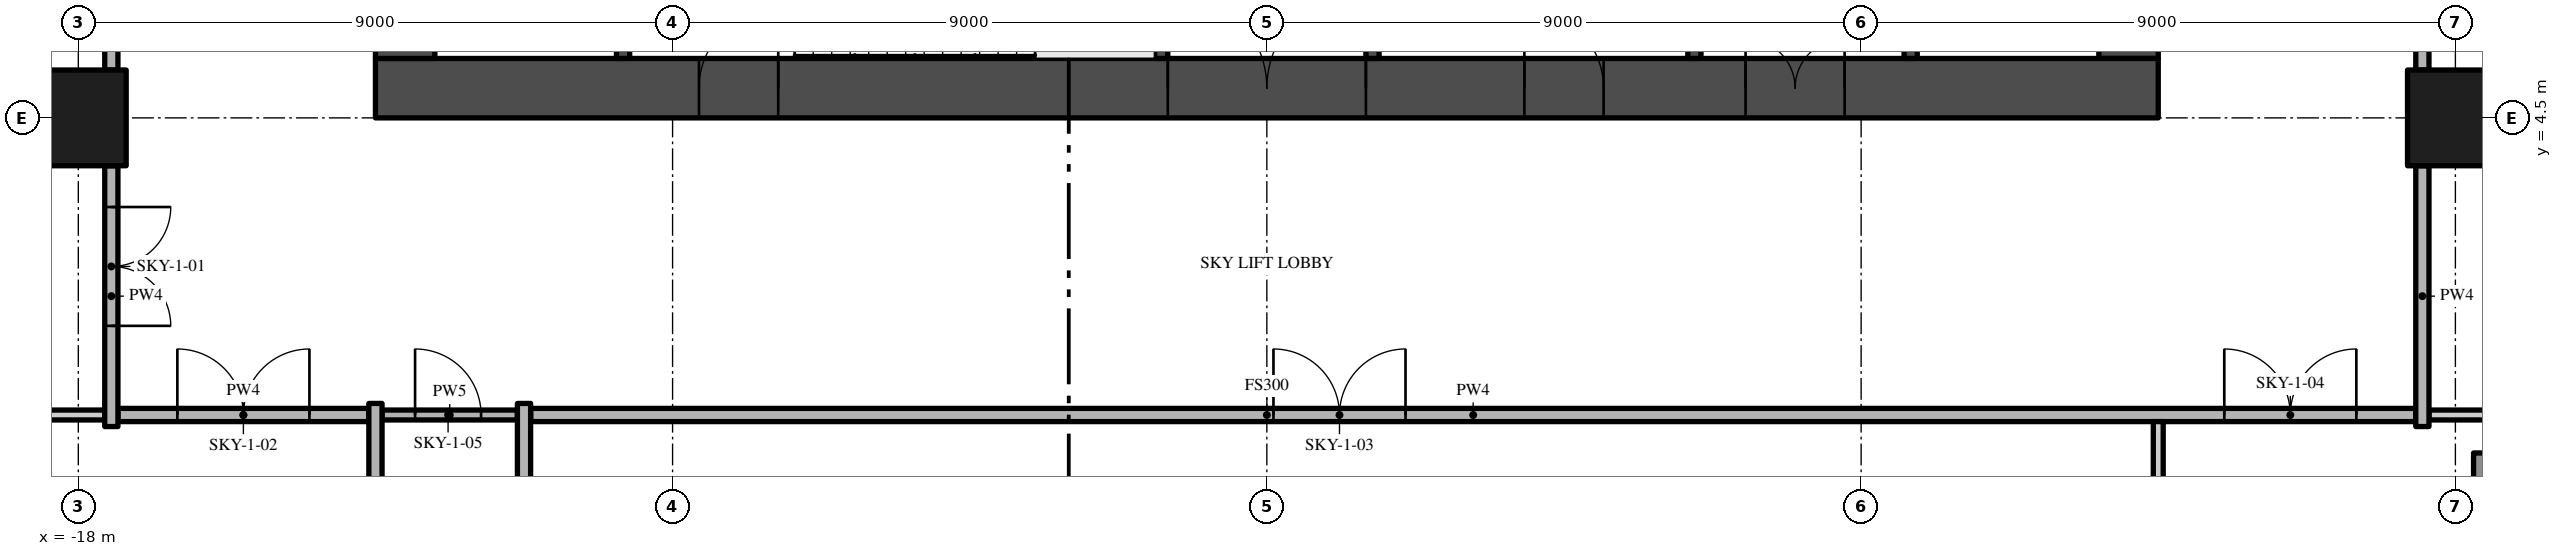
"""IFC4 building model, lengths in metres.
Left out: names, types, materials, properties, quantities, classifications, styles, units other than length and angle.
Written with IfcOpenShell. Run it as: python <this file> out.ifc"""

import sys

from ifc_helpers import new_model, si_unit, direction, frame, frame_2d, origin, origin_2d, place, context, subcontext, project, spatial, polyline, rectangle, outline, extrude, element, fill, save


model = new_model("IFC4")
c1 = context("Model", 3, precision=1e-05, world=origin(), true_north=direction((0.0, 1.0)))
c2 = subcontext(c1, "Body", "Model", "MODEL_VIEW")
j1 = project(units=[si_unit("LENGTHUNIT", "METRE"), si_unit("PLANEANGLEUNIT", "RADIAN")], contexts=[c1])
p1 = place(None, origin())
s1 = spatial("IfcSite", under=j1, at=p1, CompositionType="ELEMENT")
p2 = place(p1, origin())
s2 = spatial("IfcBuilding", under=s1, at=p2, CompositionType="ELEMENT")
p3 = place(p2, frame((0.0, 0.0, 64.4)))
s3 = spatial("IfcBuildingStorey", under=s2, at=p3, CompositionType="ELEMENT", Elevation=64.4)
p4 = place(p3, frame((-13.5, 4.95, -0.3), z_axis=(0.0, 0.0, 1.0), x_axis=(1.0, 0.0, 0.0)))
e1 = element("IfcWall", 1, at=p4, inside=s3, PredefinedType="SHEAR", context=c2, shape_type="SweptSolid", body=[
    extrude(rectangle(XDim=27.0, YDim=0.9, at=frame_2d((13.5, 0.0))), origin(), (0.0, 0.0, 1.0), 5.0),
])
p5 = place(p4, frame((12.0, 0.0, 0.3)))
e2 = element("IfcOpeningElement", 2, at=p5, cuts=e1, PredefinedType="OPENING", context=c2, shape_type="SweptSolid", body=[
    extrude(rectangle(XDim=3.0, YDim=2.4, at=frame_2d((1.5, 1.2))), frame((0.0, 0.46, 0.0), z_axis=(0.0, -1.0, 0.0), x_axis=(1.0, 0.0, 0.0)), (0.0, 0.0, 1.0), 0.92),
])
p6 = place(p4, frame((4.9, 0.0, 0.3)))
e3 = element("IfcOpeningElement", 3, at=p6, cuts=e1, PredefinedType="OPENING", context=c2, shape_type="SweptSolid", body=[
    extrude(rectangle(XDim=1.2, YDim=2.2, at=frame_2d((0.6, 1.1))), frame((0.0, 0.46, 0.0), z_axis=(0.0, -1.0, 0.0), x_axis=(1.0, 0.0, 0.0)), (0.0, 0.0, 1.0), 0.92),
])
p7 = place(p4, frame((20.75, 0.0, 0.3)))
e4 = element("IfcOpeningElement", 4, at=p7, cuts=e1, PredefinedType="OPENING", context=c2, shape_type="SweptSolid", body=[
    extrude(rectangle(XDim=1.5, YDim=2.2, at=frame_2d((0.75, 1.1))), frame((0.0, 0.46, 0.0), z_axis=(0.0, -1.0, 0.0), x_axis=(1.0, 0.0, 0.0)), (0.0, 0.0, 1.0), 0.92),
])
p8 = place(p4, frame((17.4, 0.0, 0.3)))
e5 = element("IfcOpeningElement", 5, at=p8, cuts=e1, PredefinedType="OPENING", context=c2, shape_type="SweptSolid", body=[
    extrude(rectangle(XDim=1.2, YDim=2.2, at=frame_2d((0.6, 1.1))), frame((0.0, 0.46, 0.0), z_axis=(0.0, -1.0, 0.0), x_axis=(1.0, 0.0, 0.0)), (0.0, 0.0, 1.0), 0.92),
])
p9 = place(p3, frame((13.05, 5.4, -0.3), z_axis=(0.0, 0.0, 1.0), x_axis=(0.0, 1.0, 0.0)))
e6 = element("IfcWall", 6, at=p9, inside=s3, PredefinedType="SHEAR", context=c2, shape_type="SweptSolid", body=[
    extrude(rectangle(XDim=16.2, YDim=0.9, at=frame_2d((8.1, 0.0))), origin(), (0.0, 0.0, 1.0), 5.0),
])
p10 = place(p9, frame((6.0, 0.0, 0.3)))
e7 = element("IfcOpeningElement", 7, at=p10, cuts=e6, PredefinedType="OPENING", context=c2, shape_type="SweptSolid", body=[
    extrude(rectangle(XDim=1.2, YDim=2.2, at=frame_2d((0.6, 1.1))), frame((0.0, 0.46, 0.0), z_axis=(0.0, -1.0, 0.0), x_axis=(1.0, 0.0, 0.0)), (0.0, 0.0, 1.0), 0.92),
])
p11 = place(p3, frame((-13.05, 21.6, -0.3), z_axis=(0.0, 0.0, 1.0), x_axis=(0.0, -1.0, 0.0)))
e8 = element("IfcWall", 8, at=p11, inside=s3, PredefinedType="SHEAR", context=c2, shape_type="SweptSolid", body=[
    extrude(rectangle(XDim=16.2, YDim=0.9, at=frame_2d((8.1, 0.0))), origin(), (0.0, 0.0, 1.0), 5.0),
])
p12 = place(p11, frame((9.0, 0.0, 0.3)))
e9 = element("IfcOpeningElement", 9, at=p12, cuts=e8, PredefinedType="OPENING", context=c2, shape_type="SweptSolid", body=[
    extrude(rectangle(XDim=1.2, YDim=2.2, at=frame_2d((0.6, 1.1))), frame((0.0, 0.46, 0.0), z_axis=(0.0, -1.0, 0.0), x_axis=(1.0, 0.0, 0.0)), (0.0, 0.0, 1.0), 0.92),
])
for number, where, z_axis, x_axis in (
    (10, (-18.0, 4.5, 0.0), (0.0, 0.0, 1.0), (1.0, 0.0, 0.0)),
    (11, (18.0, 4.5, 0.0), (0.0, 0.0, 1.0), (1.0, 0.0, 0.0)),
):
    element("IfcColumn", number, at=place(p3, frame(where, z_axis=z_axis, x_axis=x_axis)), inside=s3, PredefinedType="COLUMN", context=c2, shape_type="SweptSolid", body=[
        extrude(rectangle(XDim=1.45, YDim=1.45, at=origin_2d()), origin(), (0.0, 0.0, 1.0), 4.7),
    ])
for number, where, z_axis, x_axis in (
    (12, (-9.75, 5.4, 0.0), (0.0, 0.0, 1.0), (0.0, 1.0, 0.0)),
    (13, (-1.6, 5.4, 0.0), (0.0, 0.0, 1.0), (0.0, 1.0, 0.0)),
):
    element("IfcWall", number, at=place(p3, frame(where, z_axis=z_axis, x_axis=x_axis)), inside=s3, PredefinedType="SHEAR", context=c2, shape_type="SweptSolid", body=[
        extrude(rectangle(XDim=2.55, YDim=0.2, at=frame_2d((1.275, 0.0))), origin(), (0.0, 0.0, 1.0), 4.7),
    ])
p13 = place(p3, frame((1.6, 9.2, 0.0), z_axis=(0.0, 0.0, 1.0), x_axis=(0.0, -1.0, 0.0)))
e14 = element("IfcWall", 14, at=p13, inside=s3, PredefinedType="SHEAR", context=c2, shape_type="SweptSolid", body=[
    extrude(rectangle(XDim=3.8, YDim=0.2, at=frame_2d((1.9, 0.0))), origin(), (0.0, 0.0, 1.0), 4.7),
])
p14 = place(p13, frame((1.05, 0.0, 0.0)))
e15 = element("IfcOpeningElement", 15, at=p14, cuts=e14, PredefinedType="OPENING", context=c2, shape_type="SweptSolid", body=[
    extrude(rectangle(XDim=0.9, YDim=2.1, at=frame_2d((0.45, 1.05))), frame((0.0, 0.11, 0.0), z_axis=(0.0, -1.0, 0.0), x_axis=(1.0, 0.0, 0.0)), (0.0, 0.0, 1.0), 0.22),
])
p15 = place(p3, frame((6.475, 5.4, 0.0), z_axis=(0.0, 0.0, 1.0), x_axis=(0.0, 1.0, 0.0)))
e16 = element("IfcWall", 16, at=p15, inside=s3, PredefinedType="SHEAR", context=c2, shape_type="SweptSolid", body=[
    extrude(rectangle(XDim=3.8, YDim=0.2, at=frame_2d((1.9, 0.0))), origin(), (0.0, 0.0, 1.0), 4.7),
])
p16 = place(p3, frame((9.75, 5.4, 0.0), z_axis=(0.0, 0.0, 1.0), x_axis=(0.0, 1.0, 0.0)))
e17 = element("IfcWall", 17, at=p16, inside=s3, PredefinedType="SHEAR", context=c2, shape_type="SweptSolid", body=[
    extrude(rectangle(XDim=2.2, YDim=0.2, at=frame_2d((1.1, 0.0))), origin(), (0.0, 0.0, 1.0), 4.7),
])
p17 = place(p16, frame((0.55, 0.0, 0.0)))
e18 = element("IfcOpeningElement", 18, at=p17, cuts=e17, PredefinedType="OPENING", context=c2, shape_type="SweptSolid", body=[
    extrude(rectangle(XDim=1.1, YDim=2.1, at=frame_2d((0.55, 1.05))), frame((0.0, 0.11, 0.0), z_axis=(0.0, -1.0, 0.0), x_axis=(1.0, 0.0, 0.0)), (0.0, 0.0, 1.0), 0.22),
])
p18 = place(p3, frame((-17.4, 0.0, 0.0), z_axis=(0.0, 0.0, 1.0), x_axis=(1.0, 0.0, 0.0)))
e19 = element("IfcWall", 19, at=p18, inside=s3, PredefinedType="PARTITIONING", context=c2, shape_type="SweptSolid", body=[
    extrude(rectangle(XDim=3.8, YDim=0.2, at=frame_2d((1.9, 0.0))), origin(), (0.0, 0.0, 1.0), 4.7),
])
p19 = place(p18, frame((0.9, 0.0, 0.0)))
e20 = element("IfcOpeningElement", 20, at=p19, cuts=e19, PredefinedType="OPENING", context=c2, shape_type="SweptSolid", body=[
    extrude(rectangle(XDim=2.0, YDim=2.4, at=frame_2d((1.0, 1.2))), frame((0.0, 0.11, 0.0), z_axis=(0.0, -1.0, 0.0), x_axis=(1.0, 0.0, 0.0)), (0.0, 0.0, 1.0), 0.22),
])
p20 = place(p3, frame((-11.15, 0.0, 0.0), z_axis=(0.0, 0.0, 1.0), x_axis=(1.0, 0.0, 0.0)))
e21 = element("IfcWall", 21, at=p20, inside=s3, PredefinedType="PARTITIONING", context=c2, shape_type="SweptSolid", body=[
    extrude(rectangle(XDim=28.55, YDim=0.2, at=frame_2d((14.275, 0.0))), origin(), (0.0, 0.0, 1.0), 4.7),
])
p21 = place(p20, frame((11.25, 0.0, 0.0)))
e22 = element("IfcOpeningElement", 22, at=p21, cuts=e21, PredefinedType="OPENING", context=c2, shape_type="SweptSolid", body=[
    extrude(rectangle(XDim=2.0, YDim=2.4, at=frame_2d((1.0, 1.2))), frame((0.0, 0.11, 0.0), z_axis=(0.0, -1.0, 0.0), x_axis=(1.0, 0.0, 0.0)), (0.0, 0.0, 1.0), 0.22),
])
p22 = place(p20, frame((25.65, 0.0, 0.0)))
e23 = element("IfcOpeningElement", 23, at=p22, cuts=e21, PredefinedType="OPENING", context=c2, shape_type="SweptSolid", body=[
    extrude(rectangle(XDim=2.0, YDim=2.4, at=frame_2d((1.0, 1.2))), frame((0.0, 0.11, 0.0), z_axis=(0.0, -1.0, 0.0), x_axis=(1.0, 0.0, 0.0)), (0.0, 0.0, 1.0), 0.22),
])
p23 = place(p3, frame((-26.7, 0.0, 0.0), z_axis=(0.0, 0.0, 1.0), x_axis=(1.0, 0.0, 0.0)))
e24 = element("IfcWall", 24, at=p23, inside=s3, PredefinedType="PARTITIONING", context=c2, shape_type="SweptSolid", body=[
    extrude(rectangle(XDim=9.1, YDim=0.15, at=frame_2d((4.55, 0.0))), origin(), (0.0, 0.0, 1.0), 4.7),
])
p24 = place(p3, frame((-13.4, 0.0, 0.0), z_axis=(0.0, 0.0, 1.0), x_axis=(1.0, 0.0, 0.0)))
e25 = element("IfcWall", 25, at=p24, inside=s3, PredefinedType="PARTITIONING", context=c2, shape_type="SweptSolid", body=[
    extrude(rectangle(XDim=2.05, YDim=0.15, at=frame_2d((1.025, 0.0))), origin(), (0.0, 0.0, 1.0), 4.7),
])
p25 = place(p24, frame((0.5, 0.0, 0.0)))
e26 = element("IfcOpeningElement", 26, at=p25, cuts=e25, PredefinedType="OPENING", context=c2, shape_type="SweptSolid", body=[
    extrude(rectangle(XDim=1.0, YDim=2.4, at=frame_2d((0.5, 1.2))), frame((0.0, 0.085, 0.0), z_axis=(0.0, -1.0, 0.0), x_axis=(1.0, 0.0, 0.0)), (0.0, 0.0, 1.0), 0.17),
])
p26 = place(p3, frame((17.6, 0.0, 0.0), z_axis=(0.0, 0.0, 1.0), x_axis=(1.0, 0.0, 0.0)))
e27 = element("IfcWall", 27, at=p26, inside=s3, PredefinedType="PARTITIONING", context=c2, shape_type="SweptSolid", body=[
    extrude(rectangle(XDim=9.1, YDim=0.15, at=frame_2d((4.55, 0.0))), origin(), (0.0, 0.0, 1.0), 4.7),
])
p27 = place(p3, frame((-17.5, 3.775, 0.0), z_axis=(0.0, 0.0, 1.0), x_axis=(0.0, -1.0, 0.0)))
e28 = element("IfcWall", 28, at=p27, inside=s3, PredefinedType="PARTITIONING", context=c2, shape_type="SweptSolid", body=[
    extrude(rectangle(XDim=3.95, YDim=0.2, at=frame_2d((1.975, 0.0))), origin(), (0.0, 0.0, 1.0), 4.7),
])
p28 = place(p27, frame((0.625, 0.0, 0.0)))
e29 = element("IfcOpeningElement", 29, at=p28, cuts=e28, PredefinedType="OPENING", context=c2, shape_type="SweptSolid", body=[
    extrude(rectangle(XDim=1.8, YDim=2.4, at=frame_2d((0.9, 1.2))), frame((0.0, 0.11, 0.0), z_axis=(0.0, -1.0, 0.0), x_axis=(1.0, 0.0, 0.0)), (0.0, 0.0, 1.0), 0.22),
])
p29 = place(p3, frame((-17.5, 5.225, 0.0), z_axis=(0.0, 0.0, 1.0), x_axis=(0.0, 1.0, 0.0)))
e30 = element("IfcWall", 30, at=p29, inside=s3, PredefinedType="PARTITIONING", context=c2, shape_type="SweptSolid", body=[
    extrude(rectangle(XDim=7.55, YDim=0.2, at=frame_2d((3.775, 0.0))), origin(), (0.0, 0.0, 1.0), 4.7),
])
p30 = place(p29, frame((1.1, 0.0, 0.0)))
e31 = element("IfcOpeningElement", 31, at=p30, cuts=e30, PredefinedType="OPENING", context=c2, shape_type="SweptSolid", body=[
    extrude(rectangle(XDim=0.9, YDim=2.1, at=frame_2d((0.45, 1.05))), frame((0.0, 0.11, 0.0), z_axis=(0.0, -1.0, 0.0), x_axis=(1.0, 0.0, 0.0)), (0.0, 0.0, 1.0), 0.22),
])
p31 = place(p29, frame((5.575, 0.0, 0.0)))
e32 = element("IfcOpeningElement", 32, at=p31, cuts=e30, PredefinedType="OPENING", context=c2, shape_type="SweptSolid", body=[
    extrude(rectangle(XDim=0.9, YDim=2.1, at=frame_2d((0.45, 1.05))), frame((0.0, 0.11, 0.0), z_axis=(0.0, -1.0, 0.0), x_axis=(1.0, 0.0, 0.0)), (0.0, 0.0, 1.0), 0.22),
])
p32 = place(p3, frame((-13.5, -6.85, 0.0), z_axis=(0.0, 0.0, 1.0), x_axis=(0.0, 1.0, 0.0)))
e33 = element("IfcWall", 33, at=p32, inside=s3, PredefinedType="PARTITIONING", context=c2, shape_type="SweptSolid", body=[
    extrude(rectangle(XDim=7.025, YDim=0.2, at=frame_2d((3.513, 0.0))), origin(), (0.0, 0.0, 1.0), 4.7),
])
p33 = place(p3, frame((-11.25, -6.925, 0.0), z_axis=(0.0, 0.0, 1.0), x_axis=(0.0, 1.0, 0.0)))
e34 = element("IfcWall", 34, at=p33, inside=s3, PredefinedType="PARTITIONING", context=c2, shape_type="SweptSolid", body=[
    extrude(rectangle(XDim=7.1, YDim=0.2, at=frame_2d((3.55, 0.0))), origin(), (0.0, 0.0, 1.0), 4.7),
])
p34 = place(p3, frame((13.5, -22.2, 0.0), z_axis=(0.0, 0.0, 1.0), x_axis=(0.0, 1.0, 0.0)))
e35 = element("IfcWall", 35, at=p34, inside=s3, PredefinedType="PARTITIONING", context=c2, shape_type="SweptSolid", body=[
    extrude(rectangle(XDim=22.1, YDim=0.15, at=frame_2d((11.05, 0.0))), origin(), (0.0, 0.0, 1.0), 4.7),
])
p35 = place(p3, frame((17.5, -0.175, 0.0), z_axis=(0.0, 0.0, 1.0), x_axis=(0.0, 1.0, 0.0)))
e36 = element("IfcWall", 36, at=p35, inside=s3, PredefinedType="PARTITIONING", context=c2, shape_type="SweptSolid", body=[
    extrude(rectangle(XDim=3.95, YDim=0.2, at=frame_2d((1.975, 0.0))), origin(), (0.0, 0.0, 1.0), 4.7),
])
p36 = place(p3, frame((17.5, 5.225, 0.0), z_axis=(0.0, 0.0, 1.0), x_axis=(0.0, 1.0, 0.0)))
e37 = element("IfcWall", 37, at=p36, inside=s3, PredefinedType="PARTITIONING", context=c2, shape_type="SweptSolid", body=[
    extrude(rectangle(XDim=7.55, YDim=0.2, at=frame_2d((3.775, 0.0))), origin(), (0.0, 0.0, 1.0), 4.7),
])
p37 = place(p36, frame((5.4, 0.0, 0.0)))
e38 = element("IfcOpeningElement", 38, at=p37, cuts=e37, PredefinedType="OPENING", context=c2, shape_type="SweptSolid", body=[
    extrude(rectangle(XDim=2.0, YDim=2.4, at=frame_2d((1.0, 1.2))), frame((0.0, 0.11, 0.0), z_axis=(0.0, -1.0, 0.0), x_axis=(1.0, 0.0, 0.0)), (0.0, 0.0, 1.0), 0.22),
])
p38 = place(p3, origin())
e39 = element("IfcWall", 39, at=p38, inside=s3, PredefinedType="USERDEFINED", context=c2, shape_type="SweptSolid", body=[
    extrude(outline(polyline([(20.675, -20.7), (20.675, -0.575), (18.275, -0.575), (18.275, -3.275), (19.225, -3.275), (19.225, -5.725), (18.275, -5.725), (18.275, -12.275), (19.225, -12.275), (19.225, -14.725), (18.275, -14.725), (18.275, -20.65), (19.175, -20.65), (19.175, -20.7), (20.675, -20.7)]), holes=[polyline([(19.425, -20.45), (19.425, -20.4), (18.525, -20.4), (18.525, -14.975), (19.475, -14.975), (19.475, -12.025), (18.525, -12.025), (18.525, -5.975), (19.475, -5.975), (19.475, -3.025), (18.525, -3.025), (18.525, -0.825), (20.425, -0.825), (20.425, -20.45), (19.425, -20.45)])]), origin(), (0.0, 0.0, 1.0), 0.9),
])
p39 = place(p5, frame((3.0, 0.0, 0.0), z_axis=(0.0, 0.0, 1.0), x_axis=(-1.0, 0.0, 0.0)))
e40 = element("IfcDoor", 40, at=p39, inside=s3, OperationType="DOUBLE_DOOR_SINGLE_SWING", PredefinedType="DOOR", context=c2, shape_type="SweptSolid", body=[
    extrude(rectangle(XDim=3.0, YDim=2.4, at=frame_2d((1.5, 1.2))), frame((0.0, 0.025, 0.0), z_axis=(0.0, -1.0, 0.0), x_axis=(1.0, 0.0, 0.0)), (0.0, 0.0, 1.0), 0.05),
])
fill(e2, e40)
p40 = place(p6, frame((1.2, 0.0, 0.0), z_axis=(0.0, 0.0, 1.0), x_axis=(-1.0, 0.0, 0.0)))
e41 = element("IfcDoor", 41, at=p40, inside=s3, OperationType="SINGLE_SWING_LEFT", PredefinedType="DOOR", context=c2, shape_type="SweptSolid", body=[
    extrude(rectangle(XDim=1.2, YDim=2.2, at=frame_2d((0.6, 1.1))), frame((0.0, 0.025, 0.0), z_axis=(0.0, -1.0, 0.0), x_axis=(1.0, 0.0, 0.0)), (0.0, 0.0, 1.0), 0.05),
])
fill(e3, e41)
p41 = place(p7, frame((1.5, 0.0, 0.0), z_axis=(0.0, 0.0, 1.0), x_axis=(-1.0, 0.0, 0.0)))
e42 = element("IfcDoor", 42, at=p41, inside=s3, OperationType="DOUBLE_DOOR_SINGLE_SWING", PredefinedType="DOOR", context=c2, shape_type="SweptSolid", body=[
    extrude(rectangle(XDim=1.5, YDim=2.2, at=frame_2d((0.75, 1.1))), frame((0.0, 0.025, 0.0), z_axis=(0.0, -1.0, 0.0), x_axis=(1.0, 0.0, 0.0)), (0.0, 0.0, 1.0), 0.05),
])
fill(e4, e42)
p42 = place(p8, frame((1.2, 0.0, 0.0), z_axis=(0.0, 0.0, 1.0), x_axis=(-1.0, 0.0, 0.0)))
e43 = element("IfcDoor", 43, at=p42, inside=s3, OperationType="SINGLE_SWING_RIGHT", PredefinedType="DOOR", context=c2, shape_type="SweptSolid", body=[
    extrude(rectangle(XDim=1.2, YDim=2.2, at=frame_2d((0.6, 1.1))), frame((0.0, 0.025, 0.0), z_axis=(0.0, -1.0, 0.0), x_axis=(1.0, 0.0, 0.0)), (0.0, 0.0, 1.0), 0.05),
])
fill(e5, e43)
p43 = place(p28, origin())
e44 = element("IfcDoor", 44, at=p43, inside=s3, OperationType="DOUBLE_DOOR_SINGLE_SWING", PredefinedType="DOOR", context=c2, shape_type="SweptSolid", body=[
    extrude(rectangle(XDim=1.8, YDim=2.4, at=frame_2d((0.9, 1.2))), frame((0.0, 0.025, 0.0), z_axis=(0.0, -1.0, 0.0), x_axis=(1.0, 0.0, 0.0)), (0.0, 0.0, 1.0), 0.05),
])
fill(e29, e44)
p44 = place(p19, origin())
e45 = element("IfcDoor", 45, at=p44, inside=s3, OperationType="DOUBLE_DOOR_SINGLE_SWING", PredefinedType="DOOR", context=c2, shape_type="SweptSolid", body=[
    extrude(rectangle(XDim=2.0, YDim=2.4, at=frame_2d((1.0, 1.2))), frame((0.0, 0.025, 0.0), z_axis=(0.0, -1.0, 0.0), x_axis=(1.0, 0.0, 0.0)), (0.0, 0.0, 1.0), 0.05),
])
fill(e20, e45)
p45 = place(p21, origin())
e46 = element("IfcDoor", 46, at=p45, inside=s3, OperationType="DOUBLE_DOOR_SINGLE_SWING", PredefinedType="DOOR", context=c2, shape_type="SweptSolid", body=[
    extrude(rectangle(XDim=2.0, YDim=2.4, at=frame_2d((1.0, 1.2))), frame((0.0, 0.025, 0.0), z_axis=(0.0, -1.0, 0.0), x_axis=(1.0, 0.0, 0.0)), (0.0, 0.0, 1.0), 0.05),
])
fill(e22, e46)
p46 = place(p22, origin())
e47 = element("IfcDoor", 47, at=p46, inside=s3, OperationType="DOUBLE_DOOR_SINGLE_SWING", PredefinedType="DOOR", context=c2, shape_type="SweptSolid", body=[
    extrude(rectangle(XDim=2.0, YDim=2.4, at=frame_2d((1.0, 1.2))), frame((0.0, 0.025, 0.0), z_axis=(0.0, -1.0, 0.0), x_axis=(1.0, 0.0, 0.0)), (0.0, 0.0, 1.0), 0.05),
])
fill(e23, e47)
p47 = place(p25, origin())
e48 = element("IfcDoor", 48, at=p47, inside=s3, OperationType="SINGLE_SWING_LEFT", PredefinedType="DOOR", context=c2, shape_type="SweptSolid", body=[
    extrude(rectangle(XDim=1.0, YDim=2.4, at=frame_2d((0.5, 1.2))), frame((0.0, 0.025, 0.0), z_axis=(0.0, -1.0, 0.0), x_axis=(1.0, 0.0, 0.0)), (0.0, 0.0, 1.0), 0.05),
])
fill(e26, e48)
save(model, sys.argv[1])
